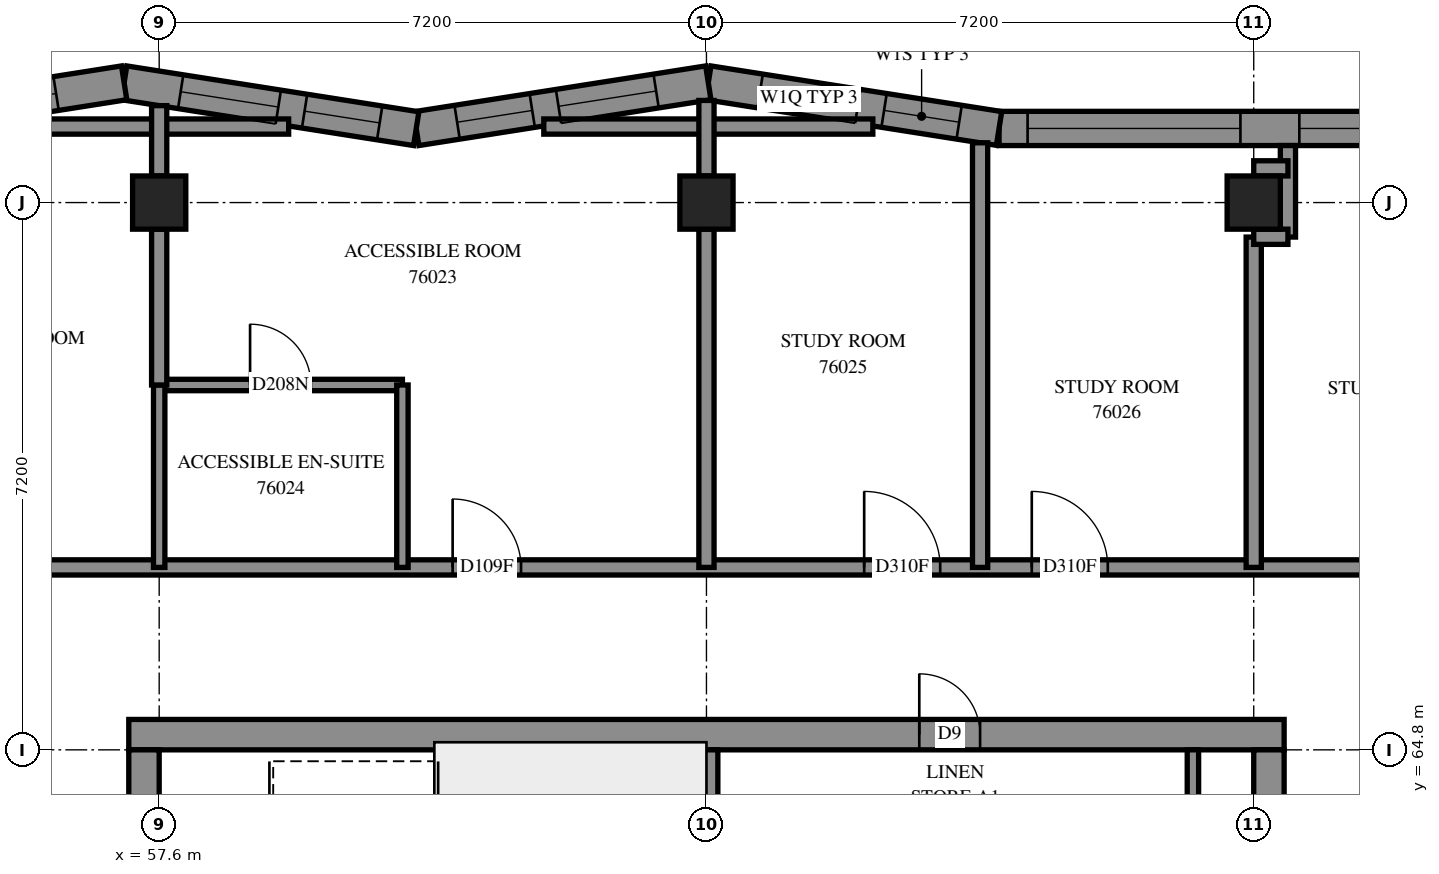
"""IFC4 building model, lengths in metres.
Left out: names, types, materials, properties, quantities, classifications, styles, units other than length and angle.
Written with IfcOpenShell. Run it as: python <this file> out.ifc"""

import sys

from ifc_helpers import new_model, si_unit, direction, frame, frame_2d, origin, origin_2d, place, context, subcontext, project, spatial, polyline, rectangle, outline, extrude, element, fill, save


model = new_model("IFC4")
c1 = context("Model", 3, precision=1e-05, world=origin(), true_north=direction((0.0, 1.0)))
c2 = subcontext(c1, "Body", "Model", "MODEL_VIEW")
j1 = project(units=[si_unit("LENGTHUNIT", "METRE"), si_unit("PLANEANGLEUNIT", "RADIAN")], contexts=[c1])
p1 = place(None, origin())
s1 = spatial("IfcSite", under=j1, at=p1, CompositionType="ELEMENT")
p2 = place(p1, origin())
s2 = spatial("IfcBuilding", under=s1, at=p2, CompositionType="ELEMENT")
p3 = place(p2, frame((0.0, 0.0, 277.8)))
s3 = spatial("IfcBuildingStorey", under=s2, at=p3, CompositionType="ELEMENT", Elevation=277.8)
for number, where, z_axis, x_axis in (
    (1, (57.6, 72.0, 0.0), (0.0, 0.0, 1.0), (1.0, 0.0, 0.0)),
    (2, (64.8, 72.0, 0.0), (0.0, 0.0, 1.0), (1.0, 0.0, 0.0)),
    (3, (72.0, 72.0, 0.0), (0.0, 0.0, 1.0), (1.0, 0.0, 0.0)),
):
    element("IfcColumn", number, at=place(p3, frame(where, z_axis=z_axis, x_axis=x_axis)), inside=s3, PredefinedType="COLUMN", context=c2, shape_type="SweptSolid", body=[
        extrude(rectangle(XDim=0.7, YDim=0.7, at=origin_2d()), origin(), (0.0, 0.0, 1.0), 3.1),
    ])
p4 = place(p3, frame((57.2, 65.0, -0.3), z_axis=(0.0, 0.0, 1.0), x_axis=(1.0, 0.0, 0.0)))
e4 = element("IfcWall", 4, at=p4, inside=s3, PredefinedType="SHEAR", context=c2, shape_type="SweptSolid", body=[
    extrude(rectangle(XDim=15.2, YDim=0.4, at=frame_2d((7.6, 0.0))), origin(), (0.0, 0.0, 1.0), 2.7),
])
p5 = place(p4, frame((10.4, 0.0, 0.3)))
e5 = element("IfcOpeningElement", 5, at=p5, cuts=e4, PredefinedType="OPENING", context=c2, shape_type="SweptSolid", body=[
    extrude(rectangle(XDim=0.8, YDim=2.1, at=frame_2d((0.4, 1.05))), frame((0.0, 0.21, 0.0), z_axis=(0.0, -1.0, 0.0), x_axis=(1.0, 0.0, 0.0)), (0.0, 0.0, 1.0), 0.42),
])
p6 = place(p3, frame((57.4, 50.4, -0.3), z_axis=(0.0, 0.0, 1.0), x_axis=(0.0, 1.0, 0.0)))
e6 = element("IfcWall", 6, at=p6, inside=s3, PredefinedType="SHEAR", context=c2, shape_type="SweptSolid", body=[
    extrude(rectangle(XDim=14.4, YDim=0.4, at=frame_2d((7.2, 0.0))), origin(), (0.0, 0.0, 1.0), 2.7),
])
p7 = place(p6, frame((4.55, 0.0, 0.3)))
e7 = element("IfcOpeningElement", 7, at=p7, cuts=e6, PredefinedType="OPENING", context=c2, shape_type="SweptSolid", body=[
    extrude(rectangle(XDim=1.1, YDim=2.1, at=frame_2d((0.55, 1.05))), frame((0.0, 0.21, 0.0), z_axis=(0.0, -1.0, 0.0), x_axis=(1.0, 0.0, 0.0)), (0.0, 0.0, 1.0), 0.42),
])
p8 = place(p6, frame((11.35, 0.0, 0.3)))
e8 = element("IfcOpeningElement", 8, at=p8, cuts=e6, PredefinedType="OPENING", context=c2, shape_type="SweptSolid", body=[
    extrude(rectangle(XDim=1.1, YDim=2.1, at=frame_2d((0.55, 1.05))), frame((0.0, 0.21, 0.0), z_axis=(0.0, -1.0, 0.0), x_axis=(1.0, 0.0, 0.0)), (0.0, 0.0, 1.0), 0.42),
])
p9 = place(p3, frame((72.2, 50.4, -0.3), z_axis=(0.0, 0.0, 1.0), x_axis=(0.0, 1.0, 0.0)))
e9 = element("IfcWall", 9, at=p9, inside=s3, PredefinedType="SHEAR", context=c2, shape_type="SweptSolid", body=[
    extrude(rectangle(XDim=14.4, YDim=0.4, at=frame_2d((7.2, 0.0))), origin(), (0.0, 0.0, 1.0), 2.7),
])
p10 = place(p9, frame((4.55, 0.0, 0.3)))
e10 = element("IfcOpeningElement", 10, at=p10, cuts=e9, PredefinedType="OPENING", context=c2, shape_type="SweptSolid", body=[
    extrude(rectangle(XDim=1.1, YDim=2.1, at=frame_2d((0.55, 1.05))), frame((0.0, 0.21, 0.0), z_axis=(0.0, -1.0, 0.0), x_axis=(1.0, 0.0, 0.0)), (0.0, 0.0, 1.0), 0.42),
])
p11 = place(p9, frame((11.35, 0.0, 0.3)))
e11 = element("IfcOpeningElement", 11, at=p11, cuts=e9, PredefinedType="OPENING", context=c2, shape_type="SweptSolid", body=[
    extrude(rectangle(XDim=1.1, YDim=2.1, at=frame_2d((0.55, 1.05))), frame((0.0, 0.21, 0.0), z_axis=(0.0, -1.0, 0.0), x_axis=(1.0, 0.0, 0.0)), (0.0, 0.0, 1.0), 0.42),
])
p12 = place(p3, frame((64.8, 60.6, 0.0), z_axis=(0.0, 0.0, 1.0), x_axis=(0.0, 1.0, 0.0)))
e12 = element("IfcWall", 12, at=p12, inside=s3, PredefinedType="SOLIDWALL", context=c2, shape_type="SweptSolid", body=[
    extrude(rectangle(XDim=4.2, YDim=0.3, at=frame_2d((2.1, 0.0))), origin(), (0.0, 0.0, 1.0), 3.1),
])
p13 = place(p3, frame((76.387, 72.975, 0.0), z_axis=(0.0, 0.0, 1.0), x_axis=(-1.0, 0.0, 0.0)))
e13 = element("IfcWall", 13, at=p13, inside=s3, PredefinedType="SOLIDWALL", context=c2, shape_type="SweptSolid", body=[
    extrude(outline(polyline([(0.034, -0.225), (7.72, -0.225), (7.755, 0.225), (-0.034, 0.225), (0.034, -0.225)])), origin(), (0.0, 0.0, 1.0), 3.1),
])
p14 = place(p13, frame((0.987, 0.0, 0.45)))
e14 = element("IfcOpeningElement", 14, at=p14, cuts=e13, PredefinedType="OPENING", context=c2, shape_type="SweptSolid", body=[
    extrude(rectangle(XDim=2.8, YDim=2.55, at=frame_2d((1.4, 1.275))), frame((0.0, 0.235, 0.0), z_axis=(0.0, -1.0, 0.0), x_axis=(1.0, 0.0, 0.0)), (0.0, 0.0, 1.0), 0.47),
])
p15 = place(p13, frame((4.562, 0.0, 0.45)))
e15 = element("IfcOpeningElement", 15, at=p15, cuts=e13, PredefinedType="OPENING", context=c2, shape_type="SweptSolid", body=[
    extrude(rectangle(XDim=2.8, YDim=2.55, at=frame_2d((1.4, 1.275))), frame((0.0, 0.235, 0.0), z_axis=(0.0, -1.0, 0.0), x_axis=(1.0, 0.0, 0.0)), (0.0, 0.0, 1.0), 0.47),
])
p16 = place(p3, frame((68.65, 72.975, 0.0), z_axis=(0.0, 0.0, 1.0), x_axis=(-0.9879128581, 0.1550102733, 0.0)))
e16 = element("IfcWall", 16, at=p16, inside=s3, PredefinedType="SOLIDWALL", context=c2, shape_type="SweptSolid", body=[
    extrude(outline(polyline([(0.018, -0.225), (3.907, -0.225), (3.837, 0.225), (-0.018, 0.225), (0.018, -0.225)])), origin(), (0.0, 0.0, 1.0), 3.1),
])
p17 = place(p16, frame((0.531, 0.0, 0.45)))
e17 = element("IfcOpeningElement", 17, at=p17, cuts=e16, PredefinedType="OPENING", context=c2, shape_type="SweptSolid", body=[
    extrude(rectangle(XDim=1.0, YDim=2.5, at=frame_2d((0.5, 1.25))), frame((0.0, 0.235, 0.0), z_axis=(0.0, -1.0, 0.0), x_axis=(1.0, 0.0, 0.0)), (0.0, 0.0, 1.0), 0.47),
])
p18 = place(p16, frame((1.881, 0.0, 0.45)))
e18 = element("IfcOpeningElement", 18, at=p18, cuts=e16, PredefinedType="OPENING", context=c2, shape_type="SweptSolid", body=[
    extrude(rectangle(XDim=1.3, YDim=2.5, at=frame_2d((0.65, 1.25))), frame((0.0, 0.235, 0.0), z_axis=(0.0, -1.0, 0.0), x_axis=(1.0, 0.0, 0.0)), (0.0, 0.0, 1.0), 0.47),
])
p19 = place(p3, frame((64.824, 73.575, 0.0), z_axis=(0.0, 0.0, 1.0), x_axis=(-0.9879107269, -0.1550238552, 0.0)))
e19 = element("IfcWall", 19, at=p19, inside=s3, PredefinedType="SOLIDWALL", context=c2, shape_type="SweptSolid", body=[
    extrude(outline(polyline([(-0.035, -0.225), (3.854, -0.225), (3.925, 0.225), (0.035, 0.225), (-0.035, -0.225)])), origin(), (0.0, 0.0, 1.0), 3.1),
])
p20 = place(p19, frame((0.695, 0.0, 0.45)))
e20 = element("IfcOpeningElement", 20, at=p20, cuts=e19, PredefinedType="OPENING", context=c2, shape_type="SweptSolid", body=[
    extrude(rectangle(XDim=1.3, YDim=2.5, at=frame_2d((0.65, 1.25))), frame((0.0, 0.235, 0.0), z_axis=(0.0, -1.0, 0.0), x_axis=(1.0, 0.0, 0.0)), (0.0, 0.0, 1.0), 0.47),
])
p21 = place(p19, frame((2.345, 0.0, 0.45)))
e21 = element("IfcOpeningElement", 21, at=p21, cuts=e19, PredefinedType="OPENING", context=c2, shape_type="SweptSolid", body=[
    extrude(rectangle(XDim=1.0, YDim=2.5, at=frame_2d((0.5, 1.25))), frame((0.0, 0.235, 0.0), z_axis=(0.0, -1.0, 0.0), x_axis=(1.0, 0.0, 0.0)), (0.0, 0.0, 1.0), 0.47),
])
p22 = place(p3, frame((60.982, 72.972, 0.0), z_axis=(0.0, 0.0, 1.0), x_axis=(-0.9879113447, 0.155019918, 0.0)))
e22 = element("IfcWall", 22, at=p22, inside=s3, PredefinedType="SOLIDWALL", context=c2, shape_type="SweptSolid", body=[
    extrude(outline(polyline([(0.035, -0.225), (3.925, -0.225), (3.854, 0.225), (-0.035, 0.225), (0.035, -0.225)])), origin(), (0.0, 0.0, 1.0), 3.1),
])
p23 = place(p22, frame((0.487, 0.0, 0.45)))
e23 = element("IfcOpeningElement", 23, at=p23, cuts=e22, PredefinedType="OPENING", context=c2, shape_type="SweptSolid", body=[
    extrude(rectangle(XDim=1.0, YDim=2.5, at=frame_2d((0.5, 1.25))), frame((0.0, 0.235, 0.0), z_axis=(0.0, -1.0, 0.0), x_axis=(1.0, 0.0, 0.0)), (0.0, 0.0, 1.0), 0.47),
])
p24 = place(p22, frame((1.837, 0.0, 0.45)))
e24 = element("IfcOpeningElement", 24, at=p24, cuts=e22, PredefinedType="OPENING", context=c2, shape_type="SweptSolid", body=[
    extrude(rectangle(XDim=1.3, YDim=2.5, at=frame_2d((0.65, 1.25))), frame((0.0, 0.235, 0.0), z_axis=(0.0, -1.0, 0.0), x_axis=(1.0, 0.0, 0.0)), (0.0, 0.0, 1.0), 0.47),
])
p25 = place(p3, frame((57.139, 73.575, 0.0), z_axis=(0.0, 0.0, 1.0), x_axis=(-0.9879128581, -0.1550102733, 0.0)))
e25 = element("IfcWall", 25, at=p25, inside=s3, PredefinedType="SOLIDWALL", context=c2, shape_type="SweptSolid", body=[
    extrude(outline(polyline([(-0.035, -0.225), (3.854, -0.225), (3.89, 0.225), (0.035, 0.225), (-0.035, -0.225)])), origin(), (0.0, 0.0, 1.0), 3.1),
])
p26 = place(p25, frame((0.906, 0.0, 0.45)))
e26 = element("IfcOpeningElement", 26, at=p26, cuts=e25, PredefinedType="OPENING", context=c2, shape_type="SweptSolid", body=[
    extrude(rectangle(XDim=1.2, YDim=2.55, at=frame_2d((0.6, 1.275))), frame((0.0, 0.235, 0.0), z_axis=(0.0, -1.0, 0.0), x_axis=(1.0, 0.0, 0.0)), (0.0, 0.0, 1.0), 0.47),
])
p27 = place(p3, frame((71.2, 63.78, 0.0), z_axis=(0.0, 0.0, 1.0), x_axis=(0.0, 1.0, 0.0)))
e27 = element("IfcWall", 27, at=p27, inside=s3, PredefinedType="PARTITIONING", context=c2, shape_type="SweptSolid", body=[
    extrude(rectangle(XDim=1.02, YDim=0.15, at=frame_2d((0.51, 0.0))), origin(), (0.0, 0.0, 1.0), 3.1),
])
p28 = place(p3, frame((55.2, 67.2, 0.0), z_axis=(0.0, 0.0, 1.0), x_axis=(1.0, 0.0, 0.0)))
e28 = element("IfcWall", 28, at=p28, inside=s3, PredefinedType="PARTITIONING", context=c2, shape_type="SweptSolid", body=[
    extrude(rectangle(XDim=19.2, YDim=0.2, at=frame_2d((9.6, 0.0))), origin(), (0.0, 0.0, 1.0), 3.1),
])
p29 = place(p28, frame((6.261, 0.0, 0.0)))
e29 = element("IfcOpeningElement", 29, at=p29, cuts=e28, PredefinedType="OPENING", context=c2, shape_type="SweptSolid", body=[
    extrude(rectangle(XDim=0.9, YDim=2.1, at=frame_2d((0.45, 1.05))), frame((0.0, 0.11, 0.0), z_axis=(0.0, -1.0, 0.0), x_axis=(1.0, 0.0, 0.0)), (0.0, 0.0, 1.0), 0.22),
])
p30 = place(p28, frame((11.675, 0.0, 0.0)))
e30 = element("IfcOpeningElement", 30, at=p30, cuts=e28, PredefinedType="OPENING", context=c2, shape_type="SweptSolid", body=[
    extrude(rectangle(XDim=1.0, YDim=2.1, at=frame_2d((0.5, 1.05))), frame((0.0, 0.11, 0.0), z_axis=(0.0, -1.0, 0.0), x_axis=(1.0, 0.0, 0.0)), (0.0, 0.0, 1.0), 0.22),
])
p31 = place(p28, frame((13.88, 0.0, 0.0)))
e31 = element("IfcOpeningElement", 31, at=p31, cuts=e28, PredefinedType="OPENING", context=c2, shape_type="SweptSolid", body=[
    extrude(rectangle(XDim=1.0, YDim=2.1, at=frame_2d((0.5, 1.05))), frame((0.0, 0.11, 0.0), z_axis=(0.0, -1.0, 0.0), x_axis=(1.0, 0.0, 0.0)), (0.0, 0.0, 1.0), 0.22),
])
p32 = place(p3, frame((68.4, 67.2, 0.0), z_axis=(0.0, 0.0, 1.0), x_axis=(0.0, 1.0, 0.0)))
e32 = element("IfcWall", 32, at=p32, inside=s3, PredefinedType="PARTITIONING", context=c2, shape_type="SweptSolid", body=[
    extrude(rectangle(XDim=5.586, YDim=0.2, at=frame_2d((2.793, 0.0))), origin(), (0.0, 0.0, 1.0), 3.1),
])
p33 = place(p3, frame((64.8, 67.2, 0.0), z_axis=(0.0, 0.0, 1.0), x_axis=(0.0, 1.0, 0.0)))
e33 = element("IfcWall", 33, at=p33, inside=s3, PredefinedType="PARTITIONING", context=c2, shape_type="SweptSolid", body=[
    extrude(rectangle(XDim=4.45, YDim=0.2, at=frame_2d((2.225, 0.0))), origin(), (0.0, 0.0, 1.0), 3.1),
])
p34 = place(p3, frame((72.0, 67.2, 0.0), z_axis=(0.0, 0.0, 1.0), x_axis=(0.0, 1.0, 0.0)))
e34 = element("IfcWall", 34, at=p34, inside=s3, PredefinedType="PARTITIONING", context=c2, shape_type="SweptSolid", body=[
    extrude(rectangle(XDim=4.346, YDim=0.2, at=frame_2d((2.173, 0.0))), origin(), (0.0, 0.0, 1.0), 3.1),
])
for number, where, z_axis, x_axis in (
    (35, (62.66, 73.0, 0.0), (0.0, 0.0, 1.0), (1.0, 0.0, 0.0)),
    (36, (54.974, 73.0, 0.0), (0.0, 0.0, 1.0), (1.0, 0.0, 0.0)),
):
    element("IfcWall", number, at=place(p3, frame(where, z_axis=z_axis, x_axis=x_axis)), inside=s3, PredefinedType="PARTITIONING", context=c2, shape_type="SweptSolid", body=[
        extrude(rectangle(XDim=4.329, YDim=0.2, at=frame_2d((2.164, 0.0))), origin(), (0.0, 0.0, 1.0), 3.1),
    ])
p35 = place(p3, frame((57.6, 69.6, 0.0), z_axis=(0.0, 0.0, 1.0), x_axis=(1.0, 0.0, 0.0)))
e37 = element("IfcWall", 37, at=p35, inside=s3, PredefinedType="PARTITIONING", context=c2, shape_type="SweptSolid", body=[
    extrude(rectangle(XDim=3.2, YDim=0.15, at=frame_2d((1.6, 0.0))), origin(), (0.0, 0.0, 1.0), 3.1),
])
p36 = place(p35, frame((1.196, 0.0, 0.0)))
e38 = element("IfcOpeningElement", 38, at=p36, cuts=e37, PredefinedType="OPENING", context=c2, shape_type="SweptSolid", body=[
    extrude(rectangle(XDim=0.8, YDim=2.1, at=frame_2d((0.4, 1.05))), frame((0.0, 0.085, 0.0), z_axis=(0.0, -1.0, 0.0), x_axis=(1.0, 0.0, 0.0)), (0.0, 0.0, 1.0), 0.17),
])
for number, where, z_axis, x_axis in (
    (39, (57.6, 67.2, 0.0), (0.0, 0.0, 1.0), (0.0, 1.0, 0.0)),
    (40, (60.8, 67.2, 0.0), (0.0, 0.0, 1.0), (0.0, 1.0, 0.0)),
):
    element("IfcWall", number, at=place(p3, frame(where, z_axis=z_axis, x_axis=x_axis)), inside=s3, PredefinedType="PARTITIONING", context=c2, shape_type="SweptSolid", body=[
        extrude(rectangle(XDim=2.4, YDim=0.15, at=frame_2d((1.2, 0.0))), origin(), (0.0, 0.0, 1.0), 3.1),
    ])
p37 = place(p3, frame((57.6, 69.6, 0.0), z_axis=(0.0, 0.0, 1.0), x_axis=(0.0, 1.0, 0.0)))
e41 = element("IfcWall", 41, at=p37, inside=s3, PredefinedType="PARTITIONING", context=c2, shape_type="SweptSolid", body=[
    extrude(rectangle(XDim=2.05, YDim=0.2, at=frame_2d((1.025, 0.0))), origin(), (0.0, 0.0, 1.0), 3.1),
])
p38 = place(p3, frame((72.45, 71.546, 0.0), z_axis=(0.0, 0.0, 1.0), x_axis=(0.0, 1.0, 0.0)))
e42 = element("IfcWall", 42, at=p38, inside=s3, PredefinedType="PARTITIONING", context=c2, shape_type="SweptSolid", body=[
    extrude(rectangle(XDim=1.204, YDim=0.2, at=frame_2d((0.602, 0.0))), origin(), (0.0, 0.0, 1.0), 3.1),
])
p39 = place(p3, frame((57.6, 72.35, 0.0), z_axis=(0.0, 0.0, 1.0), x_axis=(0.0, 1.0, 0.0)))
e43 = element("IfcWall", 43, at=p39, inside=s3, PredefinedType="PARTITIONING", context=c2, shape_type="SweptSolid", body=[
    extrude(rectangle(XDim=0.925, YDim=0.2, at=frame_2d((0.463, 0.0))), origin(), (0.0, 0.0, 1.0), 3.1),
])
p40 = place(p3, frame((64.8, 72.35, 0.0), z_axis=(0.0, 0.0, 1.0), x_axis=(0.0, 1.0, 0.0)))
e44 = element("IfcWall", 44, at=p40, inside=s3, PredefinedType="PARTITIONING", context=c2, shape_type="SweptSolid", body=[
    extrude(rectangle(XDim=0.994, YDim=0.2, at=frame_2d((0.497, 0.0))), origin(), (0.0, 0.0, 1.0), 3.1),
])
for number, where, z_axis, x_axis in (
    (45, (72.0, 71.55, 0.0), (0.0, 0.0, 1.0), (1.0, 0.0, 0.0)),
    (46, (72.0, 72.45, 0.0), (0.0, 0.0, 1.0), (1.0, 0.0, 0.0)),
):
    element("IfcWall", number, at=place(p3, frame(where, z_axis=z_axis, x_axis=x_axis)), inside=s3, PredefinedType="PARTITIONING", context=c2, shape_type="SweptSolid", body=[
        extrude(rectangle(XDim=0.45, YDim=0.2, at=frame_2d((0.225, 0.0))), origin(), (0.0, 0.0, 1.0), 3.1),
    ])
p41 = place(p14, origin())
e47 = element("IfcWindow", 47, at=p41, inside=s3, PartitioningType="SINGLE_PANEL", PredefinedType="WINDOW", context=c2, shape_type="SweptSolid", body=[
    extrude(rectangle(XDim=2.8, YDim=2.55, at=frame_2d((1.4, 1.275))), frame((0.0, 0.205, 0.0), z_axis=(0.0, -1.0, 0.0), x_axis=(1.0, 0.0, 0.0)), (0.0, 0.0, 1.0), 0.06),
])
fill(e14, e47)
p42 = place(p15, origin())
e48 = element("IfcWindow", 48, at=p42, inside=s3, PartitioningType="SINGLE_PANEL", PredefinedType="WINDOW", context=c2, shape_type="SweptSolid", body=[
    extrude(rectangle(XDim=2.8, YDim=2.55, at=frame_2d((1.4, 1.275))), frame((0.0, 0.205, 0.0), z_axis=(0.0, -1.0, 0.0), x_axis=(1.0, 0.0, 0.0)), (0.0, 0.0, 1.0), 0.06),
])
fill(e15, e48)
p43 = place(p26, origin())
e49 = element("IfcWindow", 49, at=p43, inside=s3, PartitioningType="SINGLE_PANEL", PredefinedType="WINDOW", context=c2, shape_type="SweptSolid", body=[
    extrude(rectangle(XDim=1.2, YDim=2.55, at=frame_2d((0.6, 1.275))), frame((0.0, 0.115, 0.0), z_axis=(0.0, -1.0, 0.0), x_axis=(1.0, 0.0, 0.0)), (0.0, 0.0, 1.0), 0.06),
])
fill(e26, e49)
p44 = place(p5, origin())
e50 = element("IfcDoor", 50, at=p44, inside=s3, OperationType="SINGLE_SWING_RIGHT", PredefinedType="DOOR", context=c2, shape_type="SweptSolid", body=[
    extrude(rectangle(XDim=0.8, YDim=2.1, at=frame_2d((0.4, 1.05))), frame((0.0, 0.025, 0.0), z_axis=(0.0, -1.0, 0.0), x_axis=(1.0, 0.0, 0.0)), (0.0, 0.0, 1.0), 0.05),
])
fill(e5, e50)
p45 = place(p29, origin())
e51 = element("IfcDoor", 51, at=p45, inside=s3, OperationType="SINGLE_SWING_RIGHT", PredefinedType="DOOR", context=c2, shape_type="SweptSolid", body=[
    extrude(rectangle(XDim=0.9, YDim=2.1, at=frame_2d((0.45, 1.05))), frame((0.0, 0.025, 0.0), z_axis=(0.0, -1.0, 0.0), x_axis=(1.0, 0.0, 0.0)), (0.0, 0.0, 1.0), 0.05),
])
fill(e29, e51)
p46 = place(p36, origin())
e52 = element("IfcDoor", 52, at=p46, inside=s3, OperationType="SINGLE_SWING_RIGHT", PredefinedType="DOOR", context=c2, shape_type="SweptSolid", body=[
    extrude(rectangle(XDim=0.8, YDim=2.1, at=frame_2d((0.4, 1.05))), frame((0.0, 0.025, 0.0), z_axis=(0.0, -1.0, 0.0), x_axis=(1.0, 0.0, 0.0)), (0.0, 0.0, 1.0), 0.05),
])
fill(e38, e52)
p47 = place(p30, origin())
e53 = element("IfcDoor", 53, at=p47, inside=s3, OperationType="SINGLE_SWING_RIGHT", PredefinedType="DOOR", context=c2, shape_type="SweptSolid", body=[
    extrude(rectangle(XDim=1.0, YDim=2.1, at=frame_2d((0.5, 1.05))), frame((0.0, 0.025, 0.0), z_axis=(0.0, -1.0, 0.0), x_axis=(1.0, 0.0, 0.0)), (0.0, 0.0, 1.0), 0.05),
])
fill(e30, e53)
p48 = place(p31, origin())
e54 = element("IfcDoor", 54, at=p48, inside=s3, OperationType="SINGLE_SWING_LEFT", PredefinedType="DOOR", context=c2, shape_type="SweptSolid", body=[
    extrude(rectangle(XDim=1.0, YDim=2.1, at=frame_2d((0.5, 1.05))), frame((0.0, 0.025, 0.0), z_axis=(0.0, -1.0, 0.0), x_axis=(1.0, 0.0, 0.0)), (0.0, 0.0, 1.0), 0.05),
])
fill(e31, e54)
p49 = place(p17, origin())
e55 = element("IfcWindow", 55, at=p49, inside=s3, PartitioningType="SINGLE_PANEL", PredefinedType="WINDOW", context=c2, shape_type="SweptSolid", body=[
    extrude(rectangle(XDim=1.0, YDim=2.5, at=frame_2d((0.5, 1.25))), frame((0.0, 0.205, 0.0), z_axis=(0.0, -1.0, 0.0), x_axis=(1.0, 0.0, 0.0)), (0.0, 0.0, 1.0), 0.06),
])
fill(e17, e55)
p50 = place(p18, origin())
e56 = element("IfcWindow", 56, at=p50, inside=s3, PartitioningType="SINGLE_PANEL", PredefinedType="WINDOW", context=c2, shape_type="SweptSolid", body=[
    extrude(rectangle(XDim=1.3, YDim=2.5, at=frame_2d((0.65, 1.25))), frame((0.0, 0.135, 0.0), z_axis=(0.0, -1.0, 0.0), x_axis=(1.0, 0.0, 0.0)), (0.0, 0.0, 1.0), 0.06),
])
fill(e18, e56)
p51 = place(p20, origin())
e57 = element("IfcWindow", 57, at=p51, inside=s3, PartitioningType="SINGLE_PANEL", PredefinedType="WINDOW", context=c2, shape_type="SweptSolid", body=[
    extrude(rectangle(XDim=1.3, YDim=2.5, at=frame_2d((0.65, 1.25))), frame((0.0, 0.135, 0.0), z_axis=(0.0, -1.0, 0.0), x_axis=(1.0, 0.0, 0.0)), (0.0, 0.0, 1.0), 0.06),
])
fill(e20, e57)
p52 = place(p21, origin())
e58 = element("IfcWindow", 58, at=p52, inside=s3, PartitioningType="SINGLE_PANEL", PredefinedType="WINDOW", context=c2, shape_type="SweptSolid", body=[
    extrude(rectangle(XDim=1.0, YDim=2.5, at=frame_2d((0.5, 1.25))), frame((0.0, 0.205, 0.0), z_axis=(0.0, -1.0, 0.0), x_axis=(1.0, 0.0, 0.0)), (0.0, 0.0, 1.0), 0.06),
])
fill(e21, e58)
p53 = place(p23, origin())
e59 = element("IfcWindow", 59, at=p53, inside=s3, PartitioningType="SINGLE_PANEL", PredefinedType="WINDOW", context=c2, shape_type="SweptSolid", body=[
    extrude(rectangle(XDim=1.0, YDim=2.5, at=frame_2d((0.5, 1.25))), frame((0.0, 0.205, 0.0), z_axis=(0.0, -1.0, 0.0), x_axis=(1.0, 0.0, 0.0)), (0.0, 0.0, 1.0), 0.06),
])
fill(e23, e59)
p54 = place(p24, origin())
e60 = element("IfcWindow", 60, at=p54, inside=s3, PartitioningType="SINGLE_PANEL", PredefinedType="WINDOW", context=c2, shape_type="SweptSolid", body=[
    extrude(rectangle(XDim=1.3, YDim=2.5, at=frame_2d((0.65, 1.25))), frame((0.0, 0.125, 0.0), z_axis=(0.0, -1.0, 0.0), x_axis=(1.0, 0.0, 0.0)), (0.0, 0.0, 1.0), 0.06),
])
fill(e24, e60)
save(model, sys.argv[1])
